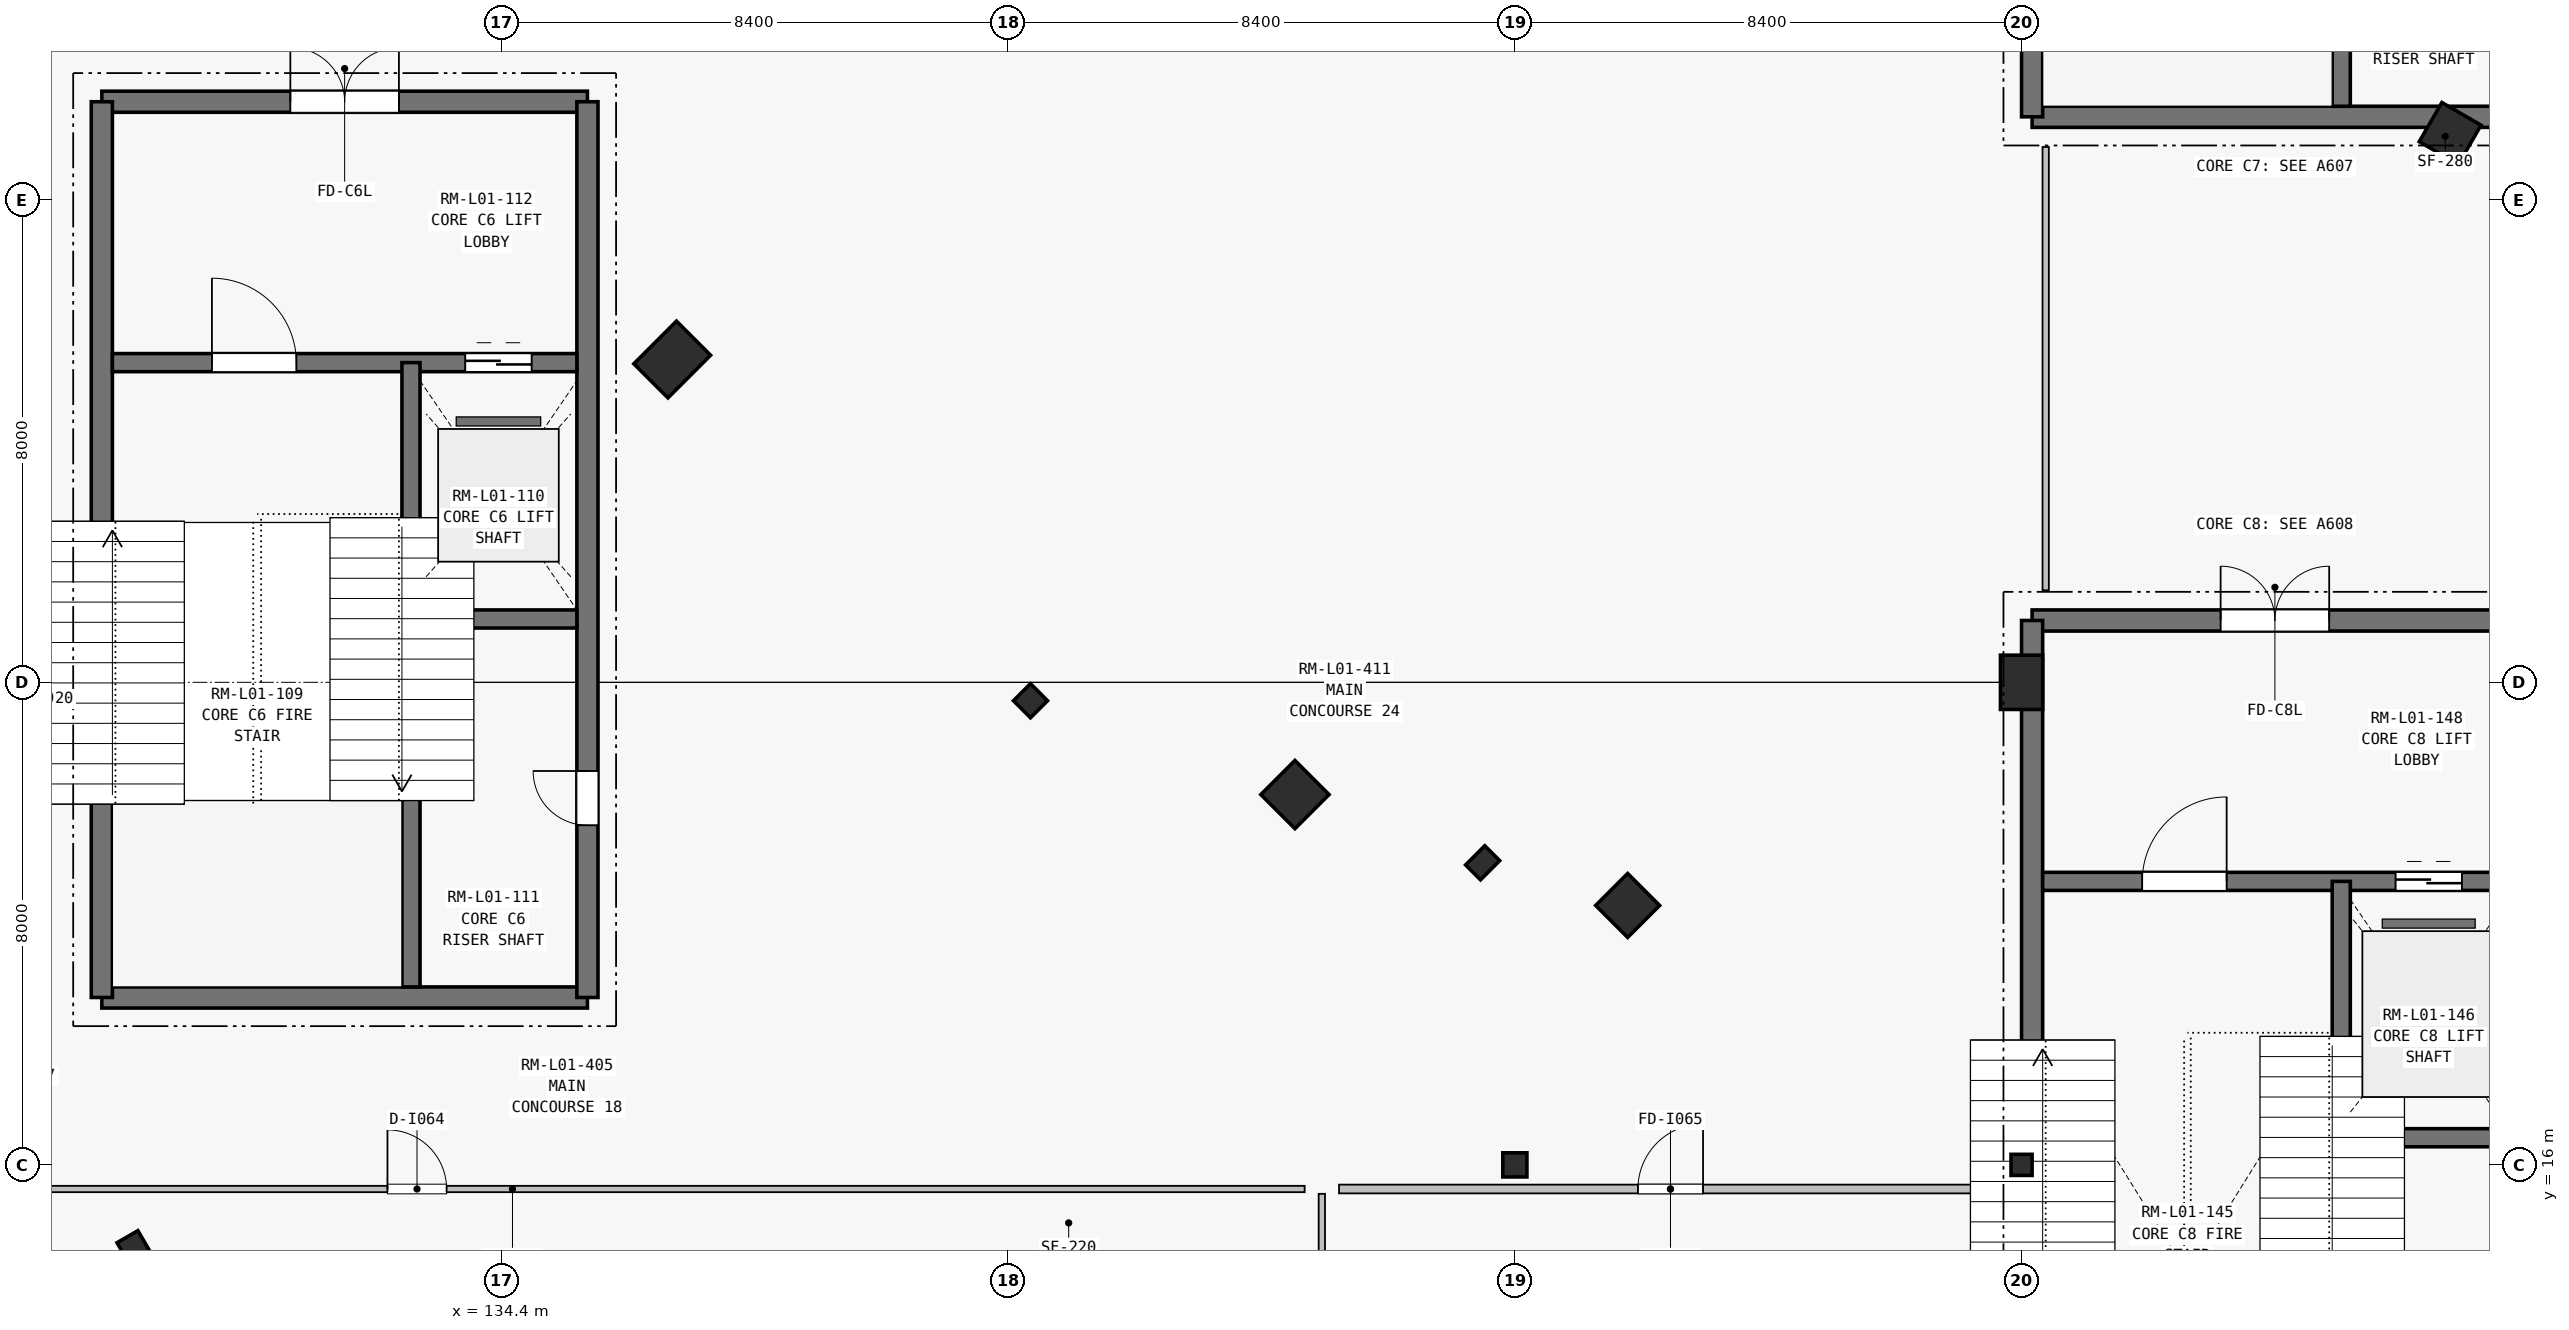
"""IFC4 building model, lengths in metres.
Left out: names, types, materials, properties, quantities, classifications, styles, units other than length and angle.
Written with IfcOpenShell. Run it as: python <this file> out.ifc"""

import sys

from ifc_helpers import new_model, si_unit, direction, frame, frame_2d, origin, origin_2d, place, context, subcontext, project, spatial, rectangle, i_section, extrude, element, fill, save


model = new_model("IFC4")
c1 = context("Model", 3, precision=1e-05, world=origin(), true_north=direction((0.0, 1.0)))
c2 = subcontext(c1, "Body", "Model", "MODEL_VIEW")
j1 = project(units=[si_unit("LENGTHUNIT", "METRE"), si_unit("PLANEANGLEUNIT", "RADIAN")], contexts=[c1])
p1 = place(None, origin())
s1 = spatial("IfcSite", under=j1, at=p1, CompositionType="ELEMENT")
p2 = place(p1, origin())
s2 = spatial("IfcBuilding", under=s1, at=p2, CompositionType="ELEMENT")
p3 = place(p2, frame((0.0, 0.0, 5.4)))
s3 = spatial("IfcBuildingStorey", under=s2, at=p3, CompositionType="ELEMENT", Elevation=5.4)
p4 = place(p3, frame((137.231, 29.352, 0.0), z_axis=(0.0, 0.0, 1.0), x_axis=(0.707106781187, -0.707106781187, 0.0)))
e1 = element("IfcColumn", 1, at=p4, inside=s3, PredefinedType="COLUMN", context=c2, shape_type="SweptSolid", body=[
    extrude(rectangle(XDim=0.8, YDim=1.0, at=origin_2d()), origin(), (0.0, 0.0, 1.0), 4.5),
])
for number, where, z_axis, x_axis in (
    (2, (128.3, 14.637, 0.0), (0.0, 0.0, 1.0), (0.5, -0.866, 0.0)),
    (3, (143.17, 23.695, 0.0), (0.0, 0.0, 1.0), (0.707, -0.707, 0.0)),
):
    element("IfcColumn", number, at=place(p3, frame(where, z_axis=z_axis, x_axis=x_axis)), inside=s3, PredefinedType="COLUMN", context=c2, shape_type="SweptSolid", body=[
        extrude(i_section(OverallWidth=0.4, OverallDepth=0.4, WebThickness=0.018, FlangeThickness=0.032, at=origin_2d()), origin(), (0.0, 0.0, 1.0), 4.5),
    ])
p5 = place(p3, frame((147.554, 22.139, 0.0), z_axis=(0.0, 0.0, 1.0), x_axis=(0.707106781187, -0.707106781187, 0.0)))
e4 = element("IfcColumn", 4, at=p5, inside=s3, PredefinedType="COLUMN", context=c2, shape_type="SweptSolid", body=[
    extrude(rectangle(XDim=0.8, YDim=0.8, at=origin_2d()), origin(), (0.0, 0.0, 1.0), 4.5),
])
for number, where, z_axis, x_axis in (
    (5, (153.07, 20.301, 0.0), (0.0, 0.0, 1.0), (0.707, -0.707, 0.0)),
    (6, (166.705, 33.1, 0.0), (0.0, 0.0, 1.0), (0.866, -0.5, 0.0)),
):
    element("IfcColumn", number, at=place(p3, frame(where, z_axis=z_axis, x_axis=x_axis)), inside=s3, PredefinedType="COLUMN", context=c2, shape_type="SweptSolid", body=[
        extrude(rectangle(XDim=0.75, YDim=0.75, at=origin_2d()), origin(), (0.0, 0.0, 1.0), 4.2),
    ])
p6 = place(p3, frame((151.2, 16.0, 0.0), z_axis=(0.0, 0.0, 1.0), x_axis=(1.0, 0.0, 0.0)))
e7 = element("IfcColumn", 7, at=p6, inside=s3, PredefinedType="COLUMN", context=c2, shape_type="SweptSolid", body=[
    extrude(i_section(OverallWidth=0.4, OverallDepth=0.4, WebThickness=0.016, FlangeThickness=0.028, at=origin_2d()), origin(), (0.0, 0.0, 1.0), 4.5),
])
p7 = place(p3, frame((159.6, 16.0, 0.0), z_axis=(0.0, 0.0, 1.0), x_axis=(1.0, 0.0, 0.0)))
e8 = element("IfcColumn", 8, at=p7, inside=s3, PredefinedType="COLUMN", context=c2, shape_type="SweptSolid", body=[
    extrude(i_section(OverallWidth=0.35, OverallDepth=0.35, WebThickness=0.014, FlangeThickness=0.024, at=origin_2d()), origin(), (0.0, 0.0, 1.0), 4.5),
])
p8 = place(p3, frame((159.6, 24.0, 0.0), z_axis=(0.0, 0.0, 1.0), x_axis=(1.0, 0.0, 0.0)))
e9 = element("IfcColumn", 9, at=p8, inside=s3, PredefinedType="COLUMN", context=c2, shape_type="SweptSolid", body=[
    extrude(rectangle(XDim=0.7, YDim=0.9, at=origin_2d()), origin(), (0.0, 0.0, 1.0), 4.5),
])
p9 = place(p3, frame((150.666, 21.008, 0.0), z_axis=(0.0, 0.0, 1.0), x_axis=(0.707106781187, -0.707106781187, 0.0)))
e10 = element("IfcColumn", 10, at=p9, inside=s3, PredefinedType="PILASTER", context=c2, shape_type="SweptSolid", body=[
    extrude(rectangle(XDim=0.35, YDim=0.45, at=origin_2d()), origin(), (0.0, 0.0, 1.0), 4.5),
])
p10 = place(p3, frame((127.775, 18.775, 0.0), z_axis=(0.0, 0.0, 1.0), x_axis=(1.0, 0.0, 0.0)))
e11 = element("IfcWall", 11, at=p10, inside=s3, PredefinedType="SHEAR", context=c2, shape_type="SweptSolid", body=[
    extrude(rectangle(XDim=8.05, YDim=0.35, at=frame_2d((4.025, 0.0))), origin(), (0.0, 0.0, 1.0), 4.5),
])
p11 = place(p3, frame((127.775, 33.625, 0.0), z_axis=(0.0, 0.0, 1.0), x_axis=(1.0, 0.0, 0.0)))
e12 = element("IfcWall", 12, at=p11, inside=s3, PredefinedType="SHEAR", context=c2, shape_type="SweptSolid", body=[
    extrude(rectangle(XDim=8.05, YDim=0.35, at=frame_2d((4.025, 0.0))), origin(), (0.0, 0.0, 1.0), 4.5),
])
p12 = place(p11, frame((3.125, 0.0, 0.0)))
e13 = element("IfcOpeningElement", 13, at=p12, cuts=e12, PredefinedType="OPENING", context=c2, shape_type="SweptSolid", body=[
    extrude(rectangle(XDim=1.8, YDim=2.25, at=frame_2d((0.9, 1.125))), frame((0.0, 0.185, 0.0), z_axis=(0.0, -1.0, 0.0), x_axis=(1.0, 0.0, 0.0)), (0.0, 0.0, 1.0), 0.37),
])
p13 = place(p3, frame((127.775, 18.775, 0.0), z_axis=(0.0, 0.0, 1.0), x_axis=(0.0, 1.0, 0.0)))
e14 = element("IfcWall", 14, at=p13, inside=s3, PredefinedType="SHEAR", context=c2, shape_type="SweptSolid", body=[
    extrude(rectangle(XDim=14.85, YDim=0.35, at=frame_2d((7.425, 0.0))), origin(), (0.0, 0.0, 1.0), 4.5),
])
p14 = place(p3, frame((135.825, 18.775, 0.0), z_axis=(0.0, 0.0, 1.0), x_axis=(0.0, 1.0, 0.0)))
e15 = element("IfcWall", 15, at=p14, inside=s3, PredefinedType="SHEAR", context=c2, shape_type="SweptSolid", body=[
    extrude(rectangle(XDim=14.85, YDim=0.35, at=frame_2d((7.425, 0.0))), origin(), (0.0, 0.0, 1.0), 4.5),
])
p15 = place(p14, frame((2.855, 0.0, 0.0)))
e16 = element("IfcOpeningElement", 16, at=p15, cuts=e15, PredefinedType="OPENING", context=c2, shape_type="SweptSolid", body=[
    extrude(rectangle(XDim=0.9, YDim=2.1, at=frame_2d((0.45, 1.05))), frame((0.0, 0.185, 0.0), z_axis=(0.0, -1.0, 0.0), x_axis=(1.0, 0.0, 0.0)), (0.0, 0.0, 1.0), 0.37),
])
p16 = place(p3, frame((127.95, 29.3, 0.0), z_axis=(0.0, 0.0, 1.0), x_axis=(1.0, 0.0, 0.0)))
e17 = element("IfcWall", 17, at=p16, inside=s3, PredefinedType="SHEAR", context=c2, shape_type="SweptSolid", body=[
    extrude(rectangle(XDim=7.7, YDim=0.3, at=frame_2d((3.85, 0.0))), origin(), (0.0, 0.0, 1.0), 4.5),
])
p17 = place(p16, frame((1.65, 0.0, 0.0)))
e18 = element("IfcOpeningElement", 18, at=p17, cuts=e17, PredefinedType="OPENING", context=c2, shape_type="SweptSolid", body=[
    extrude(rectangle(XDim=1.4, YDim=2.2, at=frame_2d((0.7, 1.1))), frame((0.0, 0.16, 0.0), z_axis=(0.0, -1.0, 0.0), x_axis=(1.0, 0.0, 0.0)), (0.0, 0.0, 1.0), 0.32),
])
p18 = place(p16, frame((5.85, 0.0, 0.0)))
e19 = element("IfcOpeningElement", 19, at=p18, cuts=e17, PredefinedType="OPENING", context=c2, shape_type="SweptSolid", body=[
    extrude(rectangle(XDim=1.1, YDim=2.2, at=frame_2d((0.55, 1.1))), frame((0.0, 0.16, 0.0), z_axis=(0.0, -1.0, 0.0), x_axis=(1.0, 0.0, 0.0)), (0.0, 0.0, 1.0), 0.32),
])
p19 = place(p3, frame((132.9, 18.95, 0.0), z_axis=(0.0, 0.0, 1.0), x_axis=(0.0, 1.0, 0.0)))
e20 = element("IfcWall", 20, at=p19, inside=s3, PredefinedType="SHEAR", context=c2, shape_type="SweptSolid", body=[
    extrude(rectangle(XDim=10.35, YDim=0.3, at=frame_2d((5.175, 0.0))), origin(), (0.0, 0.0, 1.0), 4.5),
])
p20 = place(p3, frame((133.05, 25.05, 0.0), z_axis=(0.0, 0.0, 1.0), x_axis=(1.0, 0.0, 0.0)))
e21 = element("IfcWall", 21, at=p20, inside=s3, PredefinedType="SHEAR", context=c2, shape_type="SweptSolid", body=[
    extrude(rectangle(XDim=2.6, YDim=0.3, at=frame_2d((1.3, 0.0))), origin(), (0.0, 0.0, 1.0), 4.5),
])
p21 = place(p3, frame((159.775, 33.375, 0.0), z_axis=(0.0, 0.0, 1.0), x_axis=(1.0, 0.0, 0.0)))
e22 = element("IfcWall", 22, at=p21, inside=s3, PredefinedType="SHEAR", context=c2, shape_type="SweptSolid", body=[
    extrude(rectangle(XDim=8.05, YDim=0.35, at=frame_2d((4.025, 0.0))), origin(), (0.0, 0.0, 1.0), 4.5),
])
p22 = place(p3, frame((159.775, 33.375, 0.0), z_axis=(0.0, 0.0, 1.0), x_axis=(0.0, 1.0, 0.0)))
e23 = element("IfcWall", 23, at=p22, inside=s3, PredefinedType="SHEAR", context=c2, shape_type="SweptSolid", body=[
    extrude(rectangle(XDim=14.85, YDim=0.35, at=frame_2d((7.425, 0.0))), origin(), (0.0, 0.0, 1.0), 4.5),
])
p23 = place(p3, frame((164.9, 33.55, 0.0), z_axis=(0.0, 0.0, 1.0), x_axis=(0.0, 1.0, 0.0)))
e24 = element("IfcWall", 24, at=p23, inside=s3, PredefinedType="SHEAR", context=c2, shape_type="SweptSolid", body=[
    extrude(rectangle(XDim=10.35, YDim=0.3, at=frame_2d((5.175, 0.0))), origin(), (0.0, 0.0, 1.0), 4.5),
])
p24 = place(p3, frame((159.775, 25.025, 0.0), z_axis=(0.0, 0.0, 1.0), x_axis=(1.0, 0.0, 0.0)))
e25 = element("IfcWall", 25, at=p24, inside=s3, PredefinedType="SHEAR", context=c2, shape_type="SweptSolid", body=[
    extrude(rectangle(XDim=8.05, YDim=0.35, at=frame_2d((4.025, 0.0))), origin(), (0.0, 0.0, 1.0), 4.5),
])
p25 = place(p24, frame((3.125, 0.0, 0.0)))
e26 = element("IfcOpeningElement", 26, at=p25, cuts=e25, PredefinedType="OPENING", context=c2, shape_type="SweptSolid", body=[
    extrude(rectangle(XDim=1.8, YDim=2.25, at=frame_2d((0.9, 1.125))), frame((0.0, 0.185, 0.0), z_axis=(0.0, -1.0, 0.0), x_axis=(1.0, 0.0, 0.0)), (0.0, 0.0, 1.0), 0.37),
])
p26 = place(p3, frame((159.775, 10.175, 0.0), z_axis=(0.0, 0.0, 1.0), x_axis=(0.0, 1.0, 0.0)))
e27 = element("IfcWall", 27, at=p26, inside=s3, PredefinedType="SHEAR", context=c2, shape_type="SweptSolid", body=[
    extrude(rectangle(XDim=14.85, YDim=0.35, at=frame_2d((7.425, 0.0))), origin(), (0.0, 0.0, 1.0), 4.5),
])
p27 = place(p3, frame((159.95, 20.7, 0.0), z_axis=(0.0, 0.0, 1.0), x_axis=(1.0, 0.0, 0.0)))
e28 = element("IfcWall", 28, at=p27, inside=s3, PredefinedType="SHEAR", context=c2, shape_type="SweptSolid", body=[
    extrude(rectangle(XDim=7.7, YDim=0.3, at=frame_2d((3.85, 0.0))), origin(), (0.0, 0.0, 1.0), 4.5),
])
p28 = place(p27, frame((1.65, 0.0, 0.0)))
e29 = element("IfcOpeningElement", 29, at=p28, cuts=e28, PredefinedType="OPENING", context=c2, shape_type="SweptSolid", body=[
    extrude(rectangle(XDim=1.4, YDim=2.2, at=frame_2d((0.7, 1.1))), frame((0.0, 0.16, 0.0), z_axis=(0.0, -1.0, 0.0), x_axis=(1.0, 0.0, 0.0)), (0.0, 0.0, 1.0), 0.32),
])
p29 = place(p27, frame((5.85, 0.0, 0.0)))
e30 = element("IfcOpeningElement", 30, at=p29, cuts=e28, PredefinedType="OPENING", context=c2, shape_type="SweptSolid", body=[
    extrude(rectangle(XDim=1.1, YDim=2.2, at=frame_2d((0.55, 1.1))), frame((0.0, 0.16, 0.0), z_axis=(0.0, -1.0, 0.0), x_axis=(1.0, 0.0, 0.0)), (0.0, 0.0, 1.0), 0.32),
])
p30 = place(p3, frame((164.9, 10.35, 0.0), z_axis=(0.0, 0.0, 1.0), x_axis=(0.0, 1.0, 0.0)))
e31 = element("IfcWall", 31, at=p30, inside=s3, PredefinedType="SHEAR", context=c2, shape_type="SweptSolid", body=[
    extrude(rectangle(XDim=10.35, YDim=0.3, at=frame_2d((5.175, 0.0))), origin(), (0.0, 0.0, 1.0), 4.5),
])
p31 = place(p3, frame((165.05, 16.45, 0.0), z_axis=(0.0, 0.0, 1.0), x_axis=(1.0, 0.0, 0.0)))
e32 = element("IfcWall", 32, at=p31, inside=s3, PredefinedType="SHEAR", context=c2, shape_type="SweptSolid", body=[
    extrude(rectangle(XDim=2.6, YDim=0.3, at=frame_2d((1.3, 0.0))), origin(), (0.0, 0.0, 1.0), 4.5),
])
p32 = place(p3, frame((160.0, 25.525, 0.0), z_axis=(0.0, 0.0, 1.0), x_axis=(0.0, 1.0, 0.0)))
e33 = element("IfcWall", 33, at=p32, inside=s3, PredefinedType="PARTITIONING", context=c2, shape_type="SweptSolid", body=[
    extrude(rectangle(XDim=7.35, YDim=0.105, at=frame_2d((3.675, 0.0))), origin(), (0.0, 0.0, 1.0), 4.2),
])
p33 = place(p3, frame((148.0, 15.52, 0.0), z_axis=(0.0, 0.0, 1.0), x_axis=(0.0, -1.0, 0.0)))
e34 = element("IfcWall", 34, at=p33, inside=s3, PredefinedType="PARTITIONING", context=c2, shape_type="SweptSolid", body=[
    extrude(rectangle(XDim=8.87, YDim=0.105, at=frame_2d((4.435, 0.0))), origin(), (0.0, 0.0, 1.0), 3.475),
])
p34 = place(p3, frame((118.285, 15.6, 0.0), z_axis=(0.0, 0.0, 1.0), x_axis=(1.0, 0.0, 0.0)))
e35 = element("IfcWall", 35, at=p34, inside=s3, PredefinedType="PARTITIONING", context=c2, shape_type="SweptSolid", body=[
    extrude(rectangle(XDim=29.43, YDim=0.105, at=frame_2d((14.715, 0.0))), origin(), (0.0, 0.0, 1.0), 3.475),
])
p35 = place(p34, frame((14.225, 0.0, 0.0)))
e36 = element("IfcOpeningElement", 36, at=p35, cuts=e35, PredefinedType="OPENING", context=c2, shape_type="SweptSolid", body=[
    extrude(rectangle(XDim=0.98, YDim=2.15, at=frame_2d((0.49, 1.075))), frame((0.0, 0.062, 0.0), z_axis=(0.0, -1.0, 0.0), x_axis=(1.0, 0.0, 0.0)), (0.0, 0.0, 1.0), 0.125),
])
p36 = place(p3, frame((148.285, 15.6, 0.0), z_axis=(0.0, 0.0, 1.0), x_axis=(1.0, 0.0, 0.0)))
e37 = element("IfcWall", 37, at=p36, inside=s3, PredefinedType="PARTITIONING", context=c2, shape_type="SweptSolid", body=[
    extrude(rectangle(XDim=10.99, YDim=0.145, at=frame_2d((5.495, 0.0))), origin(), (0.0, 0.0, 1.0), 3.642),
])
p37 = place(p36, frame((4.955, 0.0, 0.0)))
e38 = element("IfcOpeningElement", 38, at=p37, cuts=e37, PredefinedType="OPENING", context=c2, shape_type="SweptSolid", body=[
    extrude(rectangle(XDim=1.08, YDim=2.15, at=frame_2d((0.54, 1.075))), frame((0.0, 0.083, 0.0), z_axis=(0.0, -1.0, 0.0), x_axis=(1.0, 0.0, 0.0)), (0.0, 0.0, 1.0), 0.165),
])
p38 = place(p12, origin())
e39 = element("IfcDoor", 39, at=p38, inside=s3, OperationType="DOUBLE_DOOR_SINGLE_SWING", PredefinedType="DOOR", context=c2, shape_type="SweptSolid", body=[
    extrude(rectangle(XDim=1.8, YDim=2.25, at=frame_2d((0.9, 1.125))), frame((0.0, 0.025, 0.0), z_axis=(0.0, -1.0, 0.0), x_axis=(1.0, 0.0, 0.0)), (0.0, 0.0, 1.0), 0.05),
])
fill(e13, e39)
p39 = place(p17, origin())
e40 = element("IfcDoor", 40, at=p39, inside=s3, OperationType="SINGLE_SWING_LEFT", PredefinedType="DOOR", context=c2, shape_type="SweptSolid", body=[
    extrude(rectangle(XDim=1.4, YDim=2.2, at=frame_2d((0.7, 1.1))), frame((0.0, 0.025, 0.0), z_axis=(0.0, -1.0, 0.0), x_axis=(1.0, 0.0, 0.0)), (0.0, 0.0, 1.0), 0.05),
])
fill(e18, e40)
p40 = place(p15, origin())
e41 = element("IfcDoor", 41, at=p40, inside=s3, OperationType="SINGLE_SWING_RIGHT", PredefinedType="DOOR", context=c2, shape_type="SweptSolid", body=[
    extrude(rectangle(XDim=0.9, YDim=2.1, at=frame_2d((0.45, 1.05))), frame((0.0, 0.025, 0.0), z_axis=(0.0, -1.0, 0.0), x_axis=(1.0, 0.0, 0.0)), (0.0, 0.0, 1.0), 0.05),
])
fill(e16, e41)
p41 = place(p18, origin())
e42 = element("IfcDoor", 42, at=p41, inside=s3, OperationType="SLIDING_TO_LEFT", PredefinedType="DOOR", context=c2, shape_type="SweptSolid", body=[
    extrude(rectangle(XDim=1.1, YDim=2.2, at=frame_2d((0.55, 1.1))), frame((0.0, 0.025, 0.0), z_axis=(0.0, -1.0, 0.0), x_axis=(1.0, 0.0, 0.0)), (0.0, 0.0, 1.0), 0.05),
])
fill(e19, e42)
p42 = place(p25, origin())
e43 = element("IfcDoor", 43, at=p42, inside=s3, OperationType="DOUBLE_DOOR_SINGLE_SWING", PredefinedType="DOOR", context=c2, shape_type="SweptSolid", body=[
    extrude(rectangle(XDim=1.8, YDim=2.25, at=frame_2d((0.9, 1.125))), frame((0.0, 0.025, 0.0), z_axis=(0.0, -1.0, 0.0), x_axis=(1.0, 0.0, 0.0)), (0.0, 0.0, 1.0), 0.05),
])
fill(e26, e43)
p43 = place(p28, origin())
e44 = element("IfcDoor", 44, at=p43, inside=s3, OperationType="SINGLE_SWING_RIGHT", PredefinedType="DOOR", context=c2, shape_type="SweptSolid", body=[
    extrude(rectangle(XDim=1.4, YDim=2.2, at=frame_2d((0.7, 1.1))), frame((0.0, 0.025, 0.0), z_axis=(0.0, -1.0, 0.0), x_axis=(1.0, 0.0, 0.0)), (0.0, 0.0, 1.0), 0.05),
])
fill(e29, e44)
p44 = place(p29, origin())
e45 = element("IfcDoor", 45, at=p44, inside=s3, OperationType="SLIDING_TO_LEFT", PredefinedType="DOOR", context=c2, shape_type="SweptSolid", body=[
    extrude(rectangle(XDim=1.1, YDim=2.2, at=frame_2d((0.55, 1.1))), frame((0.0, 0.025, 0.0), z_axis=(0.0, -1.0, 0.0), x_axis=(1.0, 0.0, 0.0)), (0.0, 0.0, 1.0), 0.05),
])
fill(e30, e45)
p45 = place(p35, origin())
e46 = element("IfcDoor", 46, at=p45, inside=s3, OperationType="SINGLE_SWING_LEFT", PredefinedType="DOOR", context=c2, shape_type="SweptSolid", body=[
    extrude(rectangle(XDim=0.98, YDim=2.15, at=frame_2d((0.49, 1.075))), frame((0.0, 0.025, 0.0), z_axis=(0.0, -1.0, 0.0), x_axis=(1.0, 0.0, 0.0)), (0.0, 0.0, 1.0), 0.05),
])
fill(e36, e46)
p46 = place(p37, origin())
e47 = element("IfcDoor", 47, at=p46, inside=s3, OperationType="SINGLE_SWING_RIGHT", PredefinedType="DOOR", context=c2, shape_type="SweptSolid", body=[
    extrude(rectangle(XDim=1.08, YDim=2.15, at=frame_2d((0.54, 1.075))), frame((0.0, 0.025, 0.0), z_axis=(0.0, -1.0, 0.0), x_axis=(1.0, 0.0, 0.0)), (0.0, 0.0, 1.0), 0.05),
])
fill(e38, e47)
save(model, sys.argv[1])
